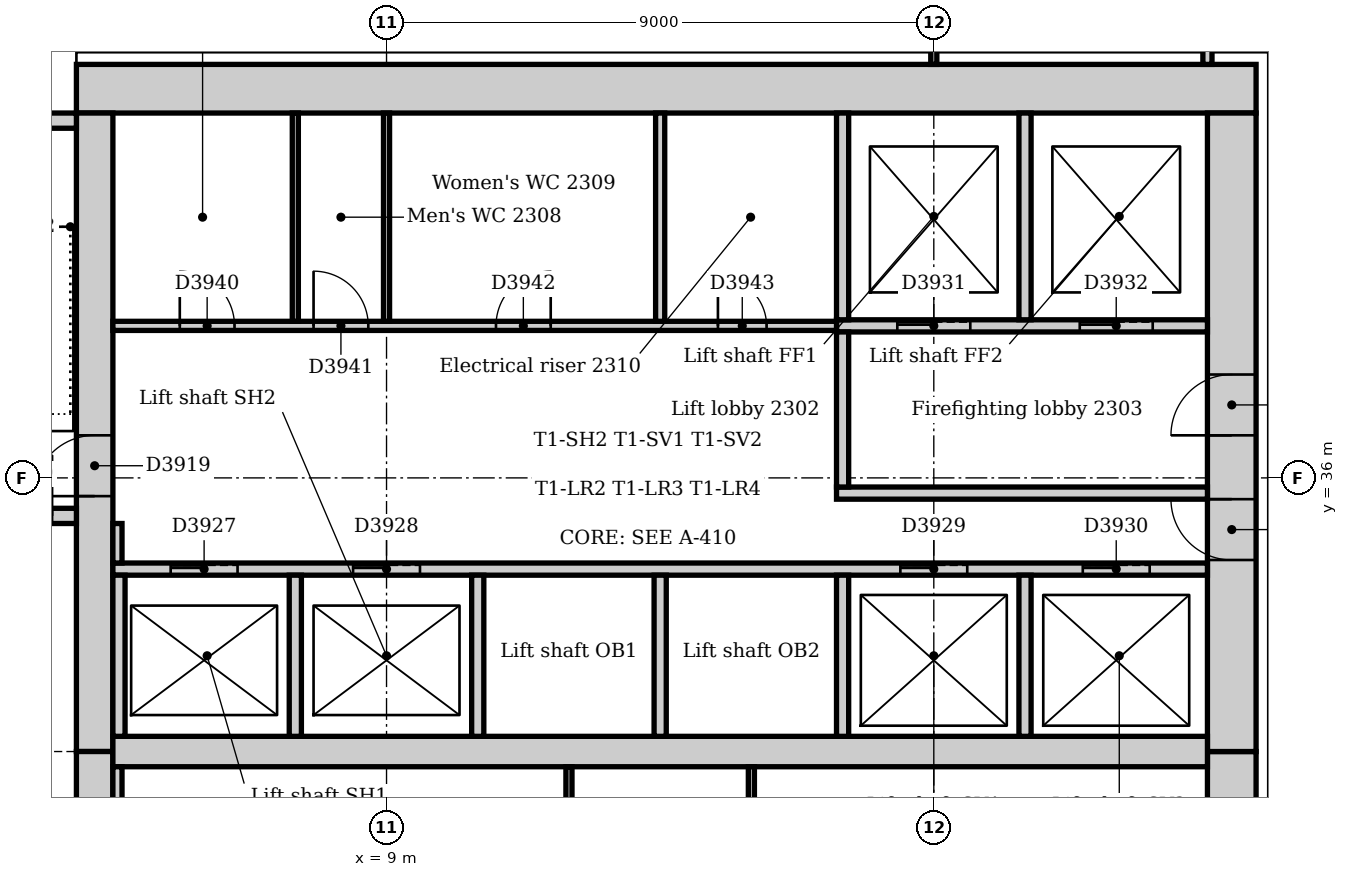
"""IFC4 building model, lengths in metres.
Left out: names, types, materials, properties, quantities, classifications, styles, units other than length and angle.
Written with IfcOpenShell. Run it as: python <this file> out.ifc"""

import sys

from ifc_helpers import new_model, si_unit, direction, frame, frame_2d, origin, place, context, subcontext, project, spatial, rectangle, extrude, element, fill, save


model = new_model("IFC4")
c1 = context("Model", 3, precision=1e-05, world=origin(), true_north=direction((0.0, 1.0)))
c2 = subcontext(c1, "Body", "Model", "MODEL_VIEW")
j1 = project(units=[si_unit("LENGTHUNIT", "METRE"), si_unit("PLANEANGLEUNIT", "RADIAN")], contexts=[c1])
p1 = place(None, origin())
s1 = spatial("IfcSite", under=j1, at=p1, CompositionType="ELEMENT")
p2 = place(p1, origin())
s2 = spatial("IfcBuilding", under=s1, at=p2, CompositionType="ELEMENT")
p3 = place(p2, frame((0.0, 0.0, 100.0)))
s3 = spatial("IfcBuildingStorey", under=s2, at=p3, CompositionType="ELEMENT", Elevation=100.0)
p4 = place(p3, frame((23.3, 42.4, 0.0), z_axis=(0.0, 0.0, 1.0), x_axis=(-1.0, 0.0, 0.0)))
e1 = element("IfcWall", 1, at=p4, inside=s3, PredefinedType="SOLIDWALL", context=c2, shape_type="SweptSolid", body=[
    extrude(rectangle(XDim=19.4, YDim=0.8, at=frame_2d((9.7, 0.0))), origin(), (0.0, 0.0, 1.0), 4.0),
])
p5 = place(p3, frame((22.9, 21.0, 0.0), z_axis=(0.0, 0.0, 1.0), x_axis=(0.0, 1.0, 0.0)))
e2 = element("IfcWall", 2, at=p5, inside=s3, PredefinedType="SOLIDWALL", context=c2, shape_type="SweptSolid", body=[
    extrude(rectangle(XDim=10.5, YDim=0.8, at=frame_2d((5.25, 0.0))), origin(), (0.0, 0.0, 1.0), 4.0),
])
p6 = place(p5, frame((4.35, 0.0, 0.0)))
e3 = element("IfcOpeningElement", 3, at=p6, cuts=e2, PredefinedType="OPENING", context=c2, shape_type="SweptSolid", body=[
    extrude(rectangle(XDim=1.8, YDim=2.1, at=frame_2d((0.9, 1.05))), frame((0.0, 0.41, 0.0), z_axis=(0.0, -1.0, 0.0), x_axis=(1.0, 0.0, 0.0)), (0.0, 0.0, 1.0), 0.82),
])
p7 = place(p3, frame((22.9, 31.5, 0.0), z_axis=(0.0, 0.0, 1.0), x_axis=(0.0, 1.0, 0.0)))
e4 = element("IfcWall", 4, at=p7, inside=s3, PredefinedType="SOLIDWALL", context=c2, shape_type="SweptSolid", body=[
    extrude(rectangle(XDim=10.5, YDim=0.8, at=frame_2d((5.25, 0.0))), origin(), (0.0, 0.0, 1.0), 4.0),
])
p8 = place(p7, frame((3.15, 0.0, 0.0)))
e5 = element("IfcOpeningElement", 5, at=p8, cuts=e4, PredefinedType="OPENING", context=c2, shape_type="SweptSolid", body=[
    extrude(rectangle(XDim=1.0, YDim=2.1, at=frame_2d((0.5, 1.05))), frame((0.0, 0.41, 0.0), z_axis=(0.0, -1.0, 0.0), x_axis=(1.0, 0.0, 0.0)), (0.0, 0.0, 1.0), 0.82),
])
p9 = place(p7, frame((5.2, 0.0, 0.0)))
e6 = element("IfcOpeningElement", 6, at=p9, cuts=e4, PredefinedType="OPENING", context=c2, shape_type="SweptSolid", body=[
    extrude(rectangle(XDim=1.0, YDim=2.1, at=frame_2d((0.5, 1.05))), frame((0.0, 0.41, 0.0), z_axis=(0.0, -1.0, 0.0), x_axis=(1.0, 0.0, 0.0)), (0.0, 0.0, 1.0), 0.82),
])
p10 = place(p3, frame((4.2, 42.0, 0.0), z_axis=(0.0, 0.0, 1.0), x_axis=(0.0, -1.0, 0.0)))
e7 = element("IfcWall", 7, at=p10, inside=s3, PredefinedType="SOLIDWALL", context=c2, shape_type="SweptSolid", body=[
    extrude(rectangle(XDim=10.5, YDim=0.6, at=frame_2d((5.25, 0.0))), origin(), (0.0, 0.0, 1.0), 4.0),
])
p11 = place(p10, frame((5.3, 0.0, 0.0)))
e8 = element("IfcOpeningElement", 8, at=p11, cuts=e7, PredefinedType="OPENING", context=c2, shape_type="SweptSolid", body=[
    extrude(rectangle(XDim=1.0, YDim=2.1, at=frame_2d((0.5, 1.05))), frame((0.0, 0.31, 0.0), z_axis=(0.0, -1.0, 0.0), x_axis=(1.0, 0.0, 0.0)), (0.0, 0.0, 1.0), 0.62),
])
p12 = place(p3, frame((4.2, 31.5, 0.0), z_axis=(0.0, 0.0, 1.0), x_axis=(0.0, -1.0, 0.0)))
e9 = element("IfcWall", 9, at=p12, inside=s3, PredefinedType="SOLIDWALL", context=c2, shape_type="SweptSolid", body=[
    extrude(rectangle(XDim=10.5, YDim=0.6, at=frame_2d((5.25, 0.0))), origin(), (0.0, 0.0, 1.0), 4.0),
])
p13 = place(p12, frame((4.25, 0.0, 0.0)))
e10 = element("IfcOpeningElement", 10, at=p13, cuts=e9, PredefinedType="OPENING", context=c2, shape_type="SweptSolid", body=[
    extrude(rectangle(XDim=1.0, YDim=2.1, at=frame_2d((0.5, 1.05))), frame((0.0, 0.31, 0.0), z_axis=(0.0, -1.0, 0.0), x_axis=(1.0, 0.0, 0.0)), (0.0, 0.0, 1.0), 0.62),
])
p14 = place(p3, frame((4.5, 31.5, 0.0), z_axis=(0.0, 0.0, 1.0), x_axis=(1.0, 0.0, 0.0)))
e11 = element("IfcWall", 11, at=p14, inside=s3, PredefinedType="SOLIDWALL", context=c2, shape_type="SweptSolid", body=[
    extrude(rectangle(XDim=18.0, YDim=0.5, at=frame_2d((9.0, 0.0))), origin(), (0.0, 0.0, 1.0), 4.0),
])
p15 = place(p3, frame((0.36, 35.375, 0.0), z_axis=(0.0, 0.0, 1.0), x_axis=(1.0, 0.0, 0.0)))
e12 = element("IfcWall", 12, at=p15, inside=s3, PredefinedType="SOLIDWALL", context=c2, shape_type="SweptSolid", body=[
    extrude(rectangle(XDim=3.54, YDim=0.25, at=frame_2d((1.77, 0.0))), origin(), (0.0, 0.0, 1.0), 4.0),
])
p16 = place(p15, frame((2.14, 0.0, 0.0)))
e13 = element("IfcOpeningElement", 13, at=p16, cuts=e12, PredefinedType="OPENING", context=c2, shape_type="SweptSolid", body=[
    extrude(rectangle(XDim=1.0, YDim=2.1, at=frame_2d((0.5, 1.05))), frame((0.0, 0.135, 0.0), z_axis=(0.0, -1.0, 0.0), x_axis=(1.0, 0.0, 0.0)), (0.0, 0.0, 1.0), 0.27),
])
p17 = place(p3, frame((3.9, 41.875, 0.0), z_axis=(0.0, 0.0, 1.0), x_axis=(-1.0, 0.0, 0.0)))
e14 = element("IfcWall", 14, at=p17, inside=s3, PredefinedType="SOLIDWALL", context=c2, shape_type="SweptSolid", body=[
    extrude(rectangle(XDim=3.54, YDim=0.25, at=frame_2d((1.77, 0.0))), origin(), (0.0, 0.0, 1.0), 4.0),
])
p18 = place(p3, frame((16.4, 35.75, 0.0), z_axis=(0.0, 0.0, 1.0), x_axis=(1.0, 0.0, 0.0)))
e15 = element("IfcWall", 15, at=p18, inside=s3, PredefinedType="PARTITIONING", context=c2, shape_type="SweptSolid", body=[
    extrude(rectangle(XDim=6.1, YDim=0.2, at=frame_2d((3.05, 0.0))), origin(), (0.0, 0.0, 1.0), 3.85),
])
p19 = place(p3, frame((16.4, 38.5, 0.0), z_axis=(0.0, 0.0, 1.0), x_axis=(1.0, 0.0, 0.0)))
e16 = element("IfcWall", 16, at=p19, inside=s3, PredefinedType="PARTITIONING", context=c2, shape_type="SweptSolid", body=[
    extrude(rectangle(XDim=6.1, YDim=0.2, at=frame_2d((3.05, 0.0))), origin(), (0.0, 0.0, 1.0), 3.85),
])
p20 = place(p19, frame((1.0, 0.0, 0.0)))
e17 = element("IfcOpeningElement", 17, at=p20, cuts=e16, PredefinedType="OPENING", context=c2, shape_type="SweptSolid", body=[
    extrude(rectangle(XDim=1.2, YDim=2.1, at=frame_2d((0.6, 1.05))), frame((0.0, 0.11, 0.0), z_axis=(0.0, -1.0, 0.0), x_axis=(1.0, 0.0, 0.0)), (0.0, 0.0, 1.0), 0.22),
])
p21 = place(p19, frame((4.0, 0.0, 0.0)))
e18 = element("IfcOpeningElement", 18, at=p21, cuts=e16, PredefinedType="OPENING", context=c2, shape_type="SweptSolid", body=[
    extrude(rectangle(XDim=1.2, YDim=2.1, at=frame_2d((0.6, 1.05))), frame((0.0, 0.11, 0.0), z_axis=(0.0, -1.0, 0.0), x_axis=(1.0, 0.0, 0.0)), (0.0, 0.0, 1.0), 0.22),
])
p22 = place(p3, frame((16.5, 35.85, 0.0), z_axis=(0.0, 0.0, 1.0), x_axis=(0.0, 1.0, 0.0)))
e19 = element("IfcWall", 19, at=p22, inside=s3, PredefinedType="PARTITIONING", context=c2, shape_type="SweptSolid", body=[
    extrude(rectangle(XDim=2.55, YDim=0.2, at=frame_2d((1.275, 0.0))), origin(), (0.0, 0.0, 1.0), 3.85),
])
p23 = place(p3, frame((4.5, 34.5, 0.0), z_axis=(0.0, 0.0, 1.0), x_axis=(1.0, 0.0, 0.0)))
e20 = element("IfcWall", 20, at=p23, inside=s3, PredefinedType="PARTITIONING", context=c2, shape_type="SweptSolid", body=[
    extrude(rectangle(XDim=18.0, YDim=0.2, at=frame_2d((9.0, 0.0))), origin(), (0.0, 0.0, 1.0), 3.85),
])
p24 = place(p23, frame((0.95, 0.0, 0.0)))
e21 = element("IfcOpeningElement", 21, at=p24, cuts=e20, PredefinedType="OPENING", context=c2, shape_type="SweptSolid", body=[
    extrude(rectangle(XDim=1.1, YDim=2.1, at=frame_2d((0.55, 1.05))), frame((0.0, 0.11, 0.0), z_axis=(0.0, -1.0, 0.0), x_axis=(1.0, 0.0, 0.0)), (0.0, 0.0, 1.0), 0.22),
])
p25 = place(p23, frame((3.95, 0.0, 0.0)))
e22 = element("IfcOpeningElement", 22, at=p25, cuts=e20, PredefinedType="OPENING", context=c2, shape_type="SweptSolid", body=[
    extrude(rectangle(XDim=1.1, YDim=2.1, at=frame_2d((0.55, 1.05))), frame((0.0, 0.11, 0.0), z_axis=(0.0, -1.0, 0.0), x_axis=(1.0, 0.0, 0.0)), (0.0, 0.0, 1.0), 0.22),
])
p26 = place(p23, frame((12.95, 0.0, 0.0)))
e23 = element("IfcOpeningElement", 23, at=p26, cuts=e20, PredefinedType="OPENING", context=c2, shape_type="SweptSolid", body=[
    extrude(rectangle(XDim=1.1, YDim=2.1, at=frame_2d((0.55, 1.05))), frame((0.0, 0.11, 0.0), z_axis=(0.0, -1.0, 0.0), x_axis=(1.0, 0.0, 0.0)), (0.0, 0.0, 1.0), 0.22),
])
p27 = place(p23, frame((15.95, 0.0, 0.0)))
e24 = element("IfcOpeningElement", 24, at=p27, cuts=e20, PredefinedType="OPENING", context=c2, shape_type="SweptSolid", body=[
    extrude(rectangle(XDim=1.1, YDim=2.1, at=frame_2d((0.55, 1.05))), frame((0.0, 0.11, 0.0), z_axis=(0.0, -1.0, 0.0), x_axis=(1.0, 0.0, 0.0)), (0.0, 0.0, 1.0), 0.22),
])
for number, where, z_axis, x_axis in (
    (25, (16.5, 38.6, 0.0), (0.0, 0.0, 1.0), (0.0, 1.0, 0.0)),
    (26, (19.5, 38.6, 0.0), (0.0, 0.0, 1.0), (0.0, 1.0, 0.0)),
):
    element("IfcWall", number, at=place(p3, frame(where, z_axis=z_axis, x_axis=x_axis)), inside=s3, PredefinedType="PARTITIONING", context=c2, shape_type="SweptSolid", body=[
        extrude(rectangle(XDim=3.4, YDim=0.2, at=frame_2d((1.7, 0.0))), origin(), (0.0, 0.0, 1.0), 3.85),
    ])
for number, where, z_axis, x_axis in (
    (27, (4.6, 31.75, 0.0), (0.0, 0.0, 1.0), (0.0, 1.0, 0.0)),
    (28, (7.5, 31.75, 0.0), (0.0, 0.0, 1.0), (0.0, 1.0, 0.0)),
    (29, (10.5, 31.75, 0.0), (0.0, 0.0, 1.0), (0.0, 1.0, 0.0)),
    (30, (13.5, 31.75, 0.0), (0.0, 0.0, 1.0), (0.0, 1.0, 0.0)),
    (31, (16.5, 31.75, 0.0), (0.0, 0.0, 1.0), (0.0, 1.0, 0.0)),
    (32, (19.5, 31.75, 0.0), (0.0, 0.0, 1.0), (0.0, 1.0, 0.0)),
):
    element("IfcWall", number, at=place(p3, frame(where, z_axis=z_axis, x_axis=x_axis)), inside=s3, PredefinedType="PARTITIONING", context=c2, shape_type="SweptSolid", body=[
        extrude(rectangle(XDim=2.65, YDim=0.2, at=frame_2d((1.325, 0.0))), origin(), (0.0, 0.0, 1.0), 3.85),
    ])
p28 = place(p3, frame((4.5, 38.5, 0.0), z_axis=(0.0, 0.0, 1.0), x_axis=(1.0, 0.0, 0.0)))
e33 = element("IfcWall", 33, at=p28, inside=s3, PredefinedType="PARTITIONING", context=c2, shape_type="SweptSolid", body=[
    extrude(rectangle(XDim=11.9, YDim=0.15, at=frame_2d((5.95, 0.0))), origin(), (0.0, 0.0, 1.0), 3.85),
])
p29 = place(p28, frame((1.1, 0.0, 0.0)))
e34 = element("IfcOpeningElement", 34, at=p29, cuts=e33, PredefinedType="OPENING", context=c2, shape_type="SweptSolid", body=[
    extrude(rectangle(XDim=0.9, YDim=2.1, at=frame_2d((0.45, 1.05))), frame((0.0, 0.085, 0.0), z_axis=(0.0, -1.0, 0.0), x_axis=(1.0, 0.0, 0.0)), (0.0, 0.0, 1.0), 0.17),
])
p30 = place(p28, frame((3.3, 0.0, 0.0)))
e35 = element("IfcOpeningElement", 35, at=p30, cuts=e33, PredefinedType="OPENING", context=c2, shape_type="SweptSolid", body=[
    extrude(rectangle(XDim=0.9, YDim=2.1, at=frame_2d((0.45, 1.05))), frame((0.0, 0.085, 0.0), z_axis=(0.0, -1.0, 0.0), x_axis=(1.0, 0.0, 0.0)), (0.0, 0.0, 1.0), 0.17),
])
p31 = place(p28, frame((6.3, 0.0, 0.0)))
e36 = element("IfcOpeningElement", 36, at=p31, cuts=e33, PredefinedType="OPENING", context=c2, shape_type="SweptSolid", body=[
    extrude(rectangle(XDim=0.9, YDim=2.1, at=frame_2d((0.45, 1.05))), frame((0.0, 0.085, 0.0), z_axis=(0.0, -1.0, 0.0), x_axis=(1.0, 0.0, 0.0)), (0.0, 0.0, 1.0), 0.17),
])
p32 = place(p28, frame((9.95, 0.0, 0.0)))
e37 = element("IfcOpeningElement", 37, at=p32, cuts=e33, PredefinedType="OPENING", context=c2, shape_type="SweptSolid", body=[
    extrude(rectangle(XDim=0.8, YDim=2.1, at=frame_2d((0.4, 1.05))), frame((0.0, 0.085, 0.0), z_axis=(0.0, -1.0, 0.0), x_axis=(1.0, 0.0, 0.0)), (0.0, 0.0, 1.0), 0.17),
])
p33 = place(p3, frame((22.5, 42.8, 0.0), z_axis=(0.0, 0.0, 1.0), x_axis=(0.0, 1.0, 0.0)))
e38 = element("IfcWall", 38, at=p33, inside=s3, PredefinedType="PARTITIONING", context=c2, shape_type="SweptSolid", body=[
    extrude(rectangle(XDim=6.34, YDim=0.15, at=frame_2d((3.17, 0.0))), origin(), (0.0, 0.0, 1.0), 3.85),
])
p34 = place(p33, frame((3.7, 0.0, 0.0)))
e39 = element("IfcOpeningElement", 39, at=p34, cuts=e38, PredefinedType="OPENING", context=c2, shape_type="SweptSolid", body=[
    extrude(rectangle(XDim=1.0, YDim=2.1, at=frame_2d((0.5, 1.05))), frame((0.0, 0.085, 0.0), z_axis=(0.0, -1.0, 0.0), x_axis=(1.0, 0.0, 0.0)), (0.0, 0.0, 1.0), 0.17),
])
p35 = place(p3, frame((4.575, 28.575, 0.0), z_axis=(0.0, 0.0, 1.0), x_axis=(0.0, 1.0, 0.0)))
e40 = element("IfcWall", 40, at=p35, inside=s3, PredefinedType="PARTITIONING", context=c2, shape_type="SweptSolid", body=[
    extrude(rectangle(XDim=2.675, YDim=0.15, at=frame_2d((1.337, 0.0))), origin(), (0.0, 0.0, 1.0), 3.85),
])
p36 = place(p3, frame((4.575, 34.6, 0.0), z_axis=(0.0, 0.0, 1.0), x_axis=(0.0, 1.0, 0.0)))
e41 = element("IfcWall", 41, at=p36, inside=s3, PredefinedType="PARTITIONING", context=c2, shape_type="SweptSolid", body=[
    extrude(rectangle(XDim=0.65, YDim=0.15, at=frame_2d((0.325, 0.0))), origin(), (0.0, 0.0, 1.0), 3.85),
])
p37 = place(p3, frame((13.5, 38.575, 0.0), z_axis=(0.0, 0.0, 1.0), x_axis=(0.0, 1.0, 0.0)))
e42 = element("IfcWall", 42, at=p37, inside=s3, PredefinedType="PARTITIONING", context=c2, shape_type="SweptSolid", body=[
    extrude(rectangle(XDim=3.425, YDim=0.15, at=frame_2d((1.712, 0.0))), origin(), (0.0, 0.0, 1.0), 3.85),
])
p38 = place(p3, frame((18.0, 42.8, 0.0), z_axis=(0.0, 0.0, 1.0), x_axis=(0.0, 1.0, 0.0)))
e43 = element("IfcWall", 43, at=p38, inside=s3, PredefinedType="PARTITIONING", context=c2, shape_type="SweptSolid", body=[
    extrude(rectangle(XDim=0.8, YDim=0.1, at=frame_2d((0.4, 0.0))), origin(), (0.0, 0.0, 1.0), 3.85),
])
for number, where, z_axis, x_axis in (
    (44, (7.5, 38.575, 0.0), (0.0, 0.0, 1.0), (0.0, 1.0, 0.0)),
    (45, (9.0, 38.575, 0.0), (0.0, 0.0, 1.0), (0.0, 1.0, 0.0)),
):
    element("IfcWall", number, at=place(p3, frame(where, z_axis=z_axis, x_axis=x_axis)), inside=s3, PredefinedType="PARTITIONING", context=c2, shape_type="SweptSolid", body=[
        extrude(rectangle(XDim=3.425, YDim=0.1, at=frame_2d((1.712, 0.0))), origin(), (0.0, 0.0, 1.0), 3.85),
    ])
for number, where, z_axis, x_axis in (
    (46, (12.0, 28.575, 0.0), (0.0, 0.0, 1.0), (0.0, 1.0, 0.0)),
    (47, (15.0, 28.575, 0.0), (0.0, 0.0, 1.0), (0.0, 1.0, 0.0)),
):
    element("IfcWall", number, at=place(p3, frame(where, z_axis=z_axis, x_axis=x_axis)), inside=s3, PredefinedType="PARTITIONING", context=c2, shape_type="SweptSolid", body=[
        extrude(rectangle(XDim=2.675, YDim=0.1, at=frame_2d((1.337, 0.0))), origin(), (0.0, 0.0, 1.0), 3.85),
    ])
p39 = place(p11, frame((1.0, 0.0, 0.0), z_axis=(0.0, 0.0, 1.0), x_axis=(-1.0, 0.0, 0.0)))
e48 = element("IfcDoor", 48, at=p39, inside=s3, OperationType="SINGLE_SWING_LEFT", PredefinedType="DOOR", context=c2, shape_type="SweptSolid", body=[
    extrude(rectangle(XDim=1.0, YDim=2.1, at=frame_2d((0.5, 1.05))), frame((0.0, 0.025, 0.0), z_axis=(0.0, -1.0, 0.0), x_axis=(1.0, 0.0, 0.0)), (0.0, 0.0, 1.0), 0.05),
])
fill(e8, e48)
p40 = place(p24, origin())
e49 = element("IfcDoor", 49, at=p40, inside=s3, OperationType="SLIDING_TO_LEFT", PredefinedType="DOOR", context=c2, shape_type="SweptSolid", body=[
    extrude(rectangle(XDim=1.1, YDim=2.1, at=frame_2d((0.55, 1.05))), frame((0.0, 0.025, 0.0), z_axis=(0.0, -1.0, 0.0), x_axis=(1.0, 0.0, 0.0)), (0.0, 0.0, 1.0), 0.05),
])
fill(e21, e49)
p41 = place(p25, origin())
e50 = element("IfcDoor", 50, at=p41, inside=s3, OperationType="SLIDING_TO_LEFT", PredefinedType="DOOR", context=c2, shape_type="SweptSolid", body=[
    extrude(rectangle(XDim=1.1, YDim=2.1, at=frame_2d((0.55, 1.05))), frame((0.0, 0.025, 0.0), z_axis=(0.0, -1.0, 0.0), x_axis=(1.0, 0.0, 0.0)), (0.0, 0.0, 1.0), 0.05),
])
fill(e22, e50)
p42 = place(p26, origin())
e51 = element("IfcDoor", 51, at=p42, inside=s3, OperationType="SLIDING_TO_LEFT", PredefinedType="DOOR", context=c2, shape_type="SweptSolid", body=[
    extrude(rectangle(XDim=1.1, YDim=2.1, at=frame_2d((0.55, 1.05))), frame((0.0, 0.025, 0.0), z_axis=(0.0, -1.0, 0.0), x_axis=(1.0, 0.0, 0.0)), (0.0, 0.0, 1.0), 0.05),
])
fill(e23, e51)
p43 = place(p27, origin())
e52 = element("IfcDoor", 52, at=p43, inside=s3, OperationType="SLIDING_TO_LEFT", PredefinedType="DOOR", context=c2, shape_type="SweptSolid", body=[
    extrude(rectangle(XDim=1.1, YDim=2.1, at=frame_2d((0.55, 1.05))), frame((0.0, 0.025, 0.0), z_axis=(0.0, -1.0, 0.0), x_axis=(1.0, 0.0, 0.0)), (0.0, 0.0, 1.0), 0.05),
])
fill(e24, e52)
p44 = place(p20, origin())
e53 = element("IfcDoor", 53, at=p44, inside=s3, OperationType="SLIDING_TO_LEFT", PredefinedType="DOOR", context=c2, shape_type="SweptSolid", body=[
    extrude(rectangle(XDim=1.2, YDim=2.1, at=frame_2d((0.6, 1.05))), frame((0.0, 0.025, 0.0), z_axis=(0.0, -1.0, 0.0), x_axis=(1.0, 0.0, 0.0)), (0.0, 0.0, 1.0), 0.05),
])
fill(e17, e53)
p45 = place(p21, origin())
e54 = element("IfcDoor", 54, at=p45, inside=s3, OperationType="SLIDING_TO_LEFT", PredefinedType="DOOR", context=c2, shape_type="SweptSolid", body=[
    extrude(rectangle(XDim=1.2, YDim=2.1, at=frame_2d((0.6, 1.05))), frame((0.0, 0.025, 0.0), z_axis=(0.0, -1.0, 0.0), x_axis=(1.0, 0.0, 0.0)), (0.0, 0.0, 1.0), 0.05),
])
fill(e18, e54)
p46 = place(p8, origin())
e55 = element("IfcDoor", 55, at=p46, inside=s3, OperationType="SINGLE_SWING_RIGHT", PredefinedType="DOOR", context=c2, shape_type="SweptSolid", body=[
    extrude(rectangle(XDim=1.0, YDim=2.1, at=frame_2d((0.5, 1.05))), frame((0.0, 0.025, 0.0), z_axis=(0.0, -1.0, 0.0), x_axis=(1.0, 0.0, 0.0)), (0.0, 0.0, 1.0), 0.05),
])
fill(e5, e55)
p47 = place(p9, origin())
e56 = element("IfcDoor", 56, at=p47, inside=s3, OperationType="SINGLE_SWING_LEFT", PredefinedType="DOOR", context=c2, shape_type="SweptSolid", body=[
    extrude(rectangle(XDim=1.0, YDim=2.1, at=frame_2d((0.5, 1.05))), frame((0.0, 0.025, 0.0), z_axis=(0.0, -1.0, 0.0), x_axis=(1.0, 0.0, 0.0)), (0.0, 0.0, 1.0), 0.05),
])
fill(e6, e56)
p48 = place(p29, origin())
e57 = element("IfcDoor", 57, at=p48, inside=s3, OperationType="SINGLE_SWING_LEFT", PredefinedType="DOOR", context=c2, shape_type="SweptSolid", body=[
    extrude(rectangle(XDim=0.9, YDim=2.1, at=frame_2d((0.45, 1.05))), frame((0.0, 0.025, 0.0), z_axis=(0.0, -1.0, 0.0), x_axis=(1.0, 0.0, 0.0)), (0.0, 0.0, 1.0), 0.05),
])
fill(e34, e57)
p49 = place(p30, origin())
e58 = element("IfcDoor", 58, at=p49, inside=s3, OperationType="SINGLE_SWING_LEFT", PredefinedType="DOOR", context=c2, shape_type="SweptSolid", body=[
    extrude(rectangle(XDim=0.9, YDim=2.1, at=frame_2d((0.45, 1.05))), frame((0.0, 0.025, 0.0), z_axis=(0.0, -1.0, 0.0), x_axis=(1.0, 0.0, 0.0)), (0.0, 0.0, 1.0), 0.05),
])
fill(e35, e58)
p50 = place(p31, origin())
e59 = element("IfcDoor", 59, at=p50, inside=s3, OperationType="SINGLE_SWING_RIGHT", PredefinedType="DOOR", context=c2, shape_type="SweptSolid", body=[
    extrude(rectangle(XDim=0.9, YDim=2.1, at=frame_2d((0.45, 1.05))), frame((0.0, 0.025, 0.0), z_axis=(0.0, -1.0, 0.0), x_axis=(1.0, 0.0, 0.0)), (0.0, 0.0, 1.0), 0.05),
])
fill(e36, e59)
p51 = place(p32, origin())
e60 = element("IfcDoor", 60, at=p51, inside=s3, OperationType="SINGLE_SWING_LEFT", PredefinedType="DOOR", context=c2, shape_type="SweptSolid", body=[
    extrude(rectangle(XDim=0.8, YDim=2.1, at=frame_2d((0.4, 1.05))), frame((0.0, 0.025, 0.0), z_axis=(0.0, -1.0, 0.0), x_axis=(1.0, 0.0, 0.0)), (0.0, 0.0, 1.0), 0.05),
])
fill(e37, e60)
save(model, sys.argv[1])
